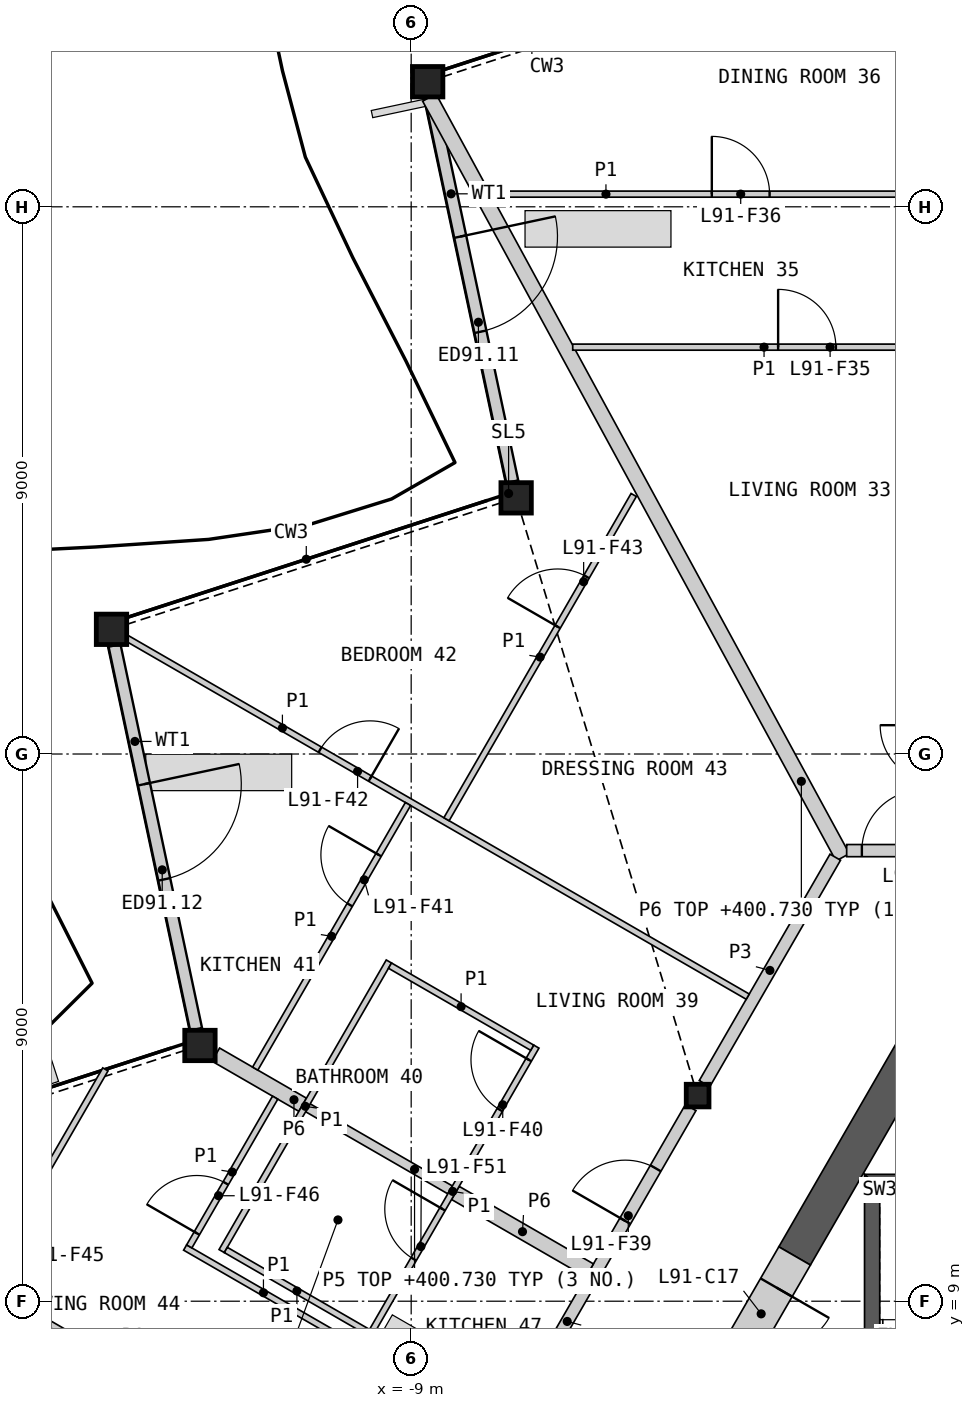
"""IFC4 building model, lengths in metres.
Left out: names, types, materials, properties, quantities, classifications, styles, units other than length and angle.
Written with IfcOpenShell. Run it as: python <this file> out.ifc"""

import sys

from ifc_helpers import new_model, si_unit, direction, frame, frame_2d, origin, origin_2d, place, context, subcontext, project, spatial, polyline, rectangle, hollow_rectangle, i_section, outline, extrude, element, fill, save


model = new_model("IFC4")
c1 = context("Model", 3, precision=1e-05, world=origin(), true_north=direction((0.0, 1.0)))
c2 = subcontext(c1, "Body", "Model", "MODEL_VIEW")
j1 = project(units=[si_unit("LENGTHUNIT", "METRE"), si_unit("PLANEANGLEUNIT", "RADIAN")], contexts=[c1])
p1 = place(None, origin())
s1 = spatial("IfcSite", under=j1, at=p1, CompositionType="ELEMENT")
p2 = place(p1, origin())
s2 = spatial("IfcBuilding", under=s1, at=p2, CompositionType="ELEMENT")
p3 = place(p2, frame((0.0, 0.0, 398.4)))
s3 = spatial("IfcBuildingStorey", under=s2, at=p3, CompositionType="ELEMENT", Elevation=398.4)
for number, where, z_axis, x_axis in (
    (1, (-8.729, 29.057, 0.0), (0.0, 0.0, 1.0), (1.0, 0.0, 0.0)),
    (2, (-7.274, 22.213, 0.0), (0.0, 0.0, 1.0), (1.0, 0.0, 0.0)),
    (3, (-13.929, 20.051, 0.0), (0.0, 0.0, 1.0), (1.0, 0.0, 0.0)),
    (4, (-12.474, 13.206, 0.0), (0.0, 0.0, 1.0), (1.0, 0.0, 0.0)),
):
    element("IfcColumn", number, at=place(p3, frame(where, z_axis=z_axis, x_axis=x_axis)), inside=s3, PredefinedType="COLUMN", context=c2, shape_type="SweptSolid", body=[
        extrude(hollow_rectangle(XDim=0.5, YDim=0.5, WallThickness=0.03, at=origin_2d()), origin(), (0.0, 0.0, 1.0), 3.4),
    ])
p4 = place(p3, frame((-4.289, 12.382, 0.0), z_axis=(0.0, 0.0, 1.0), x_axis=(1.0, 0.0, 0.0)))
e5 = element("IfcColumn", 5, at=p4, inside=s3, PredefinedType="COLUMN", context=c2, shape_type="SweptSolid", body=[
    extrude(i_section(OverallWidth=0.374, OverallDepth=0.372, WebThickness=0.016, FlangeThickness=0.026, at=origin_2d()), origin(), (0.0, 0.0, 1.0), 3.4),
])
p5 = place(p3, frame((-8.679, 28.792, 0.0), z_axis=(0.0, 0.0, 1.0), x_axis=(0.207932057694, -0.978143271399, 0.0)))
e6 = element("IfcWall", 6, at=p5, inside=s3, PredefinedType="SOLIDWALL", context=c2, shape_type="SweptSolid", body=[
    extrude(rectangle(XDim=6.453, YDim=0.2, at=frame_2d((3.227, 0.0))), origin(), (0.0, 0.0, 1.0), 2.634),
])
p6 = place(p5, frame((2.333, 0.0, 0.0)))
e7 = element("IfcOpeningElement", 7, at=p6, cuts=e6, PredefinedType="OPENING", context=c2, shape_type="SweptSolid", body=[
    extrude(rectangle(XDim=1.6, YDim=2.25, at=frame_2d((0.8, 1.125))), frame((0.0, 0.11, 0.0), z_axis=(0.0, -1.0, 0.0), x_axis=(1.0, 0.0, 0.0)), (0.0, 0.0, 1.0), 0.22),
])
p7 = place(p3, frame((-13.879, 19.785, 0.0), z_axis=(0.0, 0.0, 1.0), x_axis=(0.207895859675, -0.978150965613, 0.0)))
e8 = element("IfcWall", 8, at=p7, inside=s3, PredefinedType="SOLIDWALL", context=c2, shape_type="SweptSolid", body=[
    extrude(rectangle(XDim=6.453, YDim=0.2, at=frame_2d((3.227, 0.0))), origin(), (0.0, 0.0, 1.0), 2.634),
])
p8 = place(p7, frame((2.333, 0.0, 0.0)))
e9 = element("IfcOpeningElement", 9, at=p8, cuts=e8, PredefinedType="OPENING", context=c2, shape_type="SweptSolid", body=[
    extrude(rectangle(XDim=1.6, YDim=2.25, at=frame_2d((0.8, 1.125))), frame((0.0, 0.11, 0.0), z_axis=(0.0, -1.0, 0.0), x_axis=(1.0, 0.0, 0.0)), (0.0, 0.0, 1.0), 0.22),
])
p9 = place(p3, origin())
e10 = element("IfcWall", 10, at=p9, inside=s3, PredefinedType="SHEAR", context=c2, shape_type="SweptSolid", body=[
    extrude(outline(polyline([(1.544, 11.087), (-1.544, 11.087), (-1.294, 10.837), (1.294, 10.837), (1.544, 11.087)])), origin(), (0.0, 0.0, 1.0), 3.1),
])
p10 = place(p3, origin())
e11 = element("IfcWall", 11, at=p10, inside=s3, PredefinedType="SHEAR", context=c2, shape_type="SweptSolid", body=[
    extrude(outline(polyline([(-1.294, 10.837), (-1.544, 11.087), (-1.544, 5.237), (-1.294, 5.237), (-1.294, 10.837)])), origin(), (0.0, 0.0, 1.0), 3.1),
])
p11 = place(p3, frame((-0.26, 13.961, 0.0), z_axis=(0.0, 0.0, 1.0), x_axis=(-0.50000604952, -0.866021911064, 0.0)))
e12 = element("IfcWall", 12, at=p11, inside=s3, PredefinedType="SHEAR", context=c2, shape_type="SweptSolid", body=[
    extrude(rectangle(XDim=4.869, YDim=0.6, at=frame_2d((2.434, 0.0))), origin(), (0.0, 0.0, 1.0), 3.1),
])
p12 = place(p3, frame((-2.694, 9.745, 0.0), z_axis=(0.0, 0.0, 1.0), x_axis=(-0.50002983664, -0.866008176907, 0.0)))
e13 = element("IfcWall", 13, at=p12, inside=s3, PredefinedType="SHEAR", context=c2, shape_type="SweptSolid", body=[
    extrude(rectangle(XDim=2.2, YDim=0.6, at=frame_2d((1.1, 0.0))), origin(), (0.0, 0.0, 1.0), 3.1),
])
p13 = place(p12, frame((0.6, 0.0, 0.0)))
e14 = element("IfcOpeningElement", 14, at=p13, cuts=e13, PredefinedType="OPENING", context=c2, shape_type="SweptSolid", body=[
    extrude(rectangle(XDim=1.0, YDim=2.1, at=frame_2d((0.5, 1.05))), frame((0.0, 0.31, 0.0), z_axis=(0.0, -1.0, 0.0), x_axis=(1.0, 0.0, 0.0)), (0.0, 0.0, 1.0), 0.62),
])
p14 = place(p3, frame((-8.702, 28.797, 0.0), z_axis=(0.0, 0.0, 1.0), x_axis=(0.47791275145, -0.878407309852, 0.0)))
e15 = element("IfcWall", 15, at=p14, inside=s3, PredefinedType="PARTITIONING", context=c2, shape_type="SweptSolid", body=[
    extrude(rectangle(XDim=14.226, YDim=0.25, at=frame_2d((7.113, 0.0))), origin(), (0.0, 0.0, 1.0), 2.33),
])
p15 = place(p3, frame((-8.465, 5.15, 0.0), z_axis=(0.0, 0.0, 1.0), x_axis=(0.499992155518, 0.866029932751, 0.0)))
e16 = element("IfcWall", 16, at=p15, inside=s3, PredefinedType="PARTITIONING", context=c2, shape_type="SweptSolid", body=[
    extrude(rectangle(XDim=8.123, YDim=0.2, at=frame_2d((4.062, 0.0))), origin(), (0.0, 0.0, 1.0), 3.1),
])
p16 = place(p15, frame((5.97, 0.0, 0.0)))
e17 = element("IfcOpeningElement", 17, at=p16, cuts=e16, PredefinedType="OPENING", context=c2, shape_type="SweptSolid", body=[
    extrude(rectangle(XDim=1.0, YDim=2.1, at=frame_2d((0.5, 1.05))), frame((0.0, 0.11, 0.0), z_axis=(0.0, -1.0, 0.0), x_axis=(1.0, 0.0, 0.0)), (0.0, 0.0, 1.0), 0.22),
])
p17 = place(p15, frame((0.832, 0.0, 0.0)))
e18 = element("IfcOpeningElement", 18, at=p17, cuts=e16, PredefinedType="OPENING", context=c2, shape_type="SweptSolid", body=[
    extrude(rectangle(XDim=1.0, YDim=2.1, at=frame_2d((0.5, 1.05))), frame((0.0, 0.11, 0.0), z_axis=(0.0, -1.0, 0.0), x_axis=(1.0, 0.0, 0.0)), (0.0, 0.0, 1.0), 0.22),
])
p18 = place(p3, frame((-4.176, 12.579, 0.0), z_axis=(0.0, 0.0, 1.0), x_axis=(0.500004215162, 0.866022970146, 0.0)))
e19 = element("IfcWall", 19, at=p18, inside=s3, PredefinedType="PARTITIONING", context=c2, shape_type="SweptSolid", body=[
    extrude(rectangle(XDim=4.3, YDim=0.2, at=frame_2d((2.15, 0.0))), origin(), (0.0, 0.0, 1.0), 3.1),
])
p19 = place(p3, frame((-1.838, 16.411, 0.0), z_axis=(0.0, 0.0, 1.0), x_axis=(1.0, 0.0, 0.0)))
e20 = element("IfcWall", 20, at=p19, inside=s3, PredefinedType="PARTITIONING", context=c2, shape_type="SweptSolid", body=[
    extrude(rectangle(XDim=3.676, YDim=0.2, at=frame_2d((1.838, 0.0))), origin(), (0.0, 0.0, 1.0), 3.1),
])
p20 = place(p19, frame((0.25, 0.0, 0.0)))
e21 = element("IfcOpeningElement", 21, at=p20, cuts=e20, PredefinedType="OPENING", context=c2, shape_type="SweptSolid", body=[
    extrude(rectangle(XDim=1.0, YDim=2.1, at=frame_2d((0.5, 1.05))), frame((0.0, 0.11, 0.0), z_axis=(0.0, -1.0, 0.0), x_axis=(1.0, 0.0, 0.0)), (0.0, 0.0, 1.0), 0.22),
])
p21 = place(p3, frame((-8.273, 10.781, 0.0), z_axis=(0.0, 0.0, 1.0), x_axis=(0.866030925526, -0.499990435942, 0.0)))
e22 = element("IfcWall", 22, at=p21, inside=s3, PredefinedType="PARTITIONING", context=c2, shape_type="SweptSolid", body=[
    extrude(rectangle(XDim=2.55, YDim=0.25, at=frame_2d((1.275, 0.0))), origin(), (0.0, 0.0, 1.0), 2.33),
])
p22 = place(p3, frame((-12.214, 13.056, 0.0), z_axis=(0.0, 0.0, 1.0), x_axis=(0.866040211805, -0.499974350878, 0.0)))
e23 = element("IfcWall", 23, at=p22, inside=s3, PredefinedType="PARTITIONING", context=c2, shape_type="SweptSolid", body=[
    extrude(rectangle(XDim=1.65, YDim=0.25, at=frame_2d((0.825, 0.0))), origin(), (0.0, 0.0, 1.0), 2.33),
])
p23 = place(p3, frame((-10.698, 12.181, 0.0), z_axis=(0.0, 0.0, 1.0), x_axis=(0.86599734893, -0.500048589285, 0.0)))
e24 = element("IfcWall", 24, at=p23, inside=s3, PredefinedType="PLUMBINGWALL", context=c2, shape_type="SweptSolid", body=[
    extrude(rectangle(XDim=2.7, YDim=0.15, at=frame_2d((1.35, 0.0))), origin(), (0.0, 0.0, 1.0), 2.33),
])
p24 = place(p3, frame((-13.669, 19.9, 0.0), z_axis=(0.0, 0.0, 1.0), x_axis=(0.866032376801, -0.499987922186, 0.0)))
e25 = element("IfcWall", 25, at=p24, inside=s3, PredefinedType="PARTITIONING", context=c2, shape_type="SweptSolid", body=[
    extrude(rectangle(XDim=11.782, YDim=0.1, at=frame_2d((5.891, 0.0))), origin(), (0.0, 0.0, 1.0), 2.33),
])
p25 = place(p24, frame((3.661, 0.0, 0.0)))
e26 = element("IfcOpeningElement", 26, at=p25, cuts=e25, PredefinedType="OPENING", context=c2, shape_type="SweptSolid", body=[
    extrude(rectangle(XDim=0.95, YDim=2.1, at=frame_2d((0.475, 1.05))), frame((0.0, 0.06, 0.0), z_axis=(0.0, -1.0, 0.0), x_axis=(1.0, 0.0, 0.0)), (0.0, 0.0, 1.0), 0.12),
])
p26 = place(p3, frame((-18.869, 10.894, 0.0), z_axis=(0.0, 0.0, 1.0), x_axis=(0.866023724155, -0.500002909193, 0.0)))
e27 = element("IfcWall", 27, at=p26, inside=s3, PredefinedType="PARTITIONING", context=c2, shape_type="SweptSolid", body=[
    extrude(rectangle(XDim=11.655, YDim=0.1, at=frame_2d((5.827, 0.0))), origin(), (0.0, 0.0, 1.0), 2.33),
])
p27 = place(p26, frame((6.453, 0.0, 0.0)))
e28 = element("IfcOpeningElement", 28, at=p27, cuts=e27, PredefinedType="OPENING", context=c2, shape_type="SweptSolid", body=[
    extrude(rectangle(XDim=0.95, YDim=2.1, at=frame_2d((0.475, 1.05))), frame((0.0, 0.06, 0.0), z_axis=(0.0, -1.0, 0.0), x_axis=(1.0, 0.0, 0.0)), (0.0, 0.0, 1.0), 0.12),
])
p28 = place(p3, frame((-7.712, 27.208, 0.0), z_axis=(0.0, 0.0, 1.0), x_axis=(1.0, 0.0, 0.0)))
e29 = element("IfcWall", 29, at=p28, inside=s3, PredefinedType="PARTITIONING", context=c2, shape_type="SweptSolid", body=[
    extrude(rectangle(XDim=7.662, YDim=0.1, at=frame_2d((3.831, 0.0))), origin(), (0.0, 0.0, 1.0), 2.33),
])
p29 = place(p28, frame((3.657, 0.0, 0.0)))
e30 = element("IfcOpeningElement", 30, at=p29, cuts=e29, PredefinedType="OPENING", context=c2, shape_type="SweptSolid", body=[
    extrude(rectangle(XDim=0.95, YDim=2.1, at=frame_2d((0.475, 1.05))), frame((0.0, 0.06, 0.0), z_axis=(0.0, -1.0, 0.0), x_axis=(1.0, 0.0, 0.0)), (0.0, 0.0, 1.0), 0.12),
])
p30 = place(p3, frame((-6.343, 24.692, 0.0), z_axis=(0.0, 0.0, 1.0), x_axis=(1.0, 0.0, 0.0)))
e31 = element("IfcWall", 31, at=p30, inside=s3, PredefinedType="PARTITIONING", context=c2, shape_type="SweptSolid", body=[
    extrude(rectangle(XDim=6.293, YDim=0.1, at=frame_2d((3.146, 0.0))), origin(), (0.0, 0.0, 1.0), 2.33),
])
p31 = place(p30, frame((3.378, 0.0, 0.0)))
e32 = element("IfcOpeningElement", 32, at=p31, cuts=e31, PredefinedType="OPENING", context=c2, shape_type="SweptSolid", body=[
    extrude(rectangle(XDim=0.95, YDim=2.1, at=frame_2d((0.475, 1.05))), frame((0.0, 0.06, 0.0), z_axis=(0.0, -1.0, 0.0), x_axis=(1.0, 0.0, 0.0)), (0.0, 0.0, 1.0), 0.12),
])
p32 = place(p3, frame((-8.419, 16.927, 0.0), z_axis=(0.0, 0.0, 1.0), x_axis=(0.500027893485, 0.866009298874, 0.0)))
e33 = element("IfcWall", 33, at=p32, inside=s3, PredefinedType="PARTITIONING", context=c2, shape_type="SweptSolid", body=[
    extrude(rectangle(XDim=6.158, YDim=0.1, at=frame_2d((3.079, 0.0))), origin(), (0.0, 0.0, 1.0), 2.33),
])
p33 = place(p32, frame((3.656, 0.0, 0.0)))
e34 = element("IfcOpeningElement", 34, at=p33, cuts=e33, PredefinedType="OPENING", context=c2, shape_type="SweptSolid", body=[
    extrude(rectangle(XDim=0.95, YDim=2.1, at=frame_2d((0.475, 1.05))), frame((0.0, 0.06, 0.0), z_axis=(0.0, -1.0, 0.0), x_axis=(1.0, 0.0, 0.0)), (0.0, 0.0, 1.0), 0.12),
])
p34 = place(p3, frame((-12.718, 9.883, 0.0), z_axis=(0.0, 0.0, 1.0), x_axis=(0.866017493347, -0.500013701029, 0.0)))
e35 = element("IfcWall", 35, at=p34, inside=s3, PredefinedType="PARTITIONING", context=c2, shape_type="SweptSolid", body=[
    extrude(rectangle(XDim=5.95, YDim=0.1, at=frame_2d((2.975, 0.0))), origin(), (0.0, 0.0, 1.0), 2.33),
])
p35 = place(p3, frame((-12.117, 9.824, 0.0), z_axis=(0.0, 0.0, 1.0), x_axis=(0.499996545922, 0.866027397988, 0.0)))
e36 = element("IfcWall", 36, at=p35, inside=s3, PredefinedType="PARTITIONING", context=c2, shape_type="SweptSolid", body=[
    extrude(rectangle(XDim=5.5, YDim=0.1, at=frame_2d((2.75, 0.0))), origin(), (0.0, 0.0, 1.0), 2.33),
])
p36 = place(p3, frame((-9.692, 8.425, 0.0), z_axis=(0.0, 0.0, 1.0), x_axis=(0.499996545922, 0.866027397988, 0.0)))
e37 = element("IfcWall", 37, at=p36, inside=s3, PredefinedType="PARTITIONING", context=c2, shape_type="SweptSolid", body=[
    extrude(rectangle(XDim=5.5, YDim=0.1, at=frame_2d((2.75, 0.0))), origin(), (0.0, 0.0, 1.0), 2.33),
])
p37 = place(p36, frame((4.3, 0.0, 0.0)))
e38 = element("IfcOpeningElement", 38, at=p37, cuts=e37, PredefinedType="OPENING", context=c2, shape_type="SweptSolid", body=[
    extrude(rectangle(XDim=0.95, YDim=2.1, at=frame_2d((0.475, 1.05))), frame((0.0, 0.06, 0.0), z_axis=(0.0, -1.0, 0.0), x_axis=(1.0, 0.0, 0.0)), (0.0, 0.0, 1.0), 0.12),
])
p38 = place(p36, frame((1.465, 0.0, 0.0)))
e39 = element("IfcOpeningElement", 39, at=p38, cuts=e37, PredefinedType="OPENING", context=c2, shape_type="SweptSolid", body=[
    extrude(rectangle(XDim=0.95, YDim=2.1, at=frame_2d((0.475, 1.05))), frame((0.0, 0.06, 0.0), z_axis=(0.0, -1.0, 0.0), x_axis=(1.0, 0.0, 0.0)), (0.0, 0.0, 1.0), 0.12),
])
p39 = place(p3, frame((-11.565, 12.826, 0.0), z_axis=(0.0, 0.0, 1.0), x_axis=(0.499990214365, 0.86603105345, 0.0)))
e40 = element("IfcWall", 40, at=p39, inside=s3, PredefinedType="PARTITIONING", context=c2, shape_type="SweptSolid", body=[
    extrude(rectangle(XDim=5.025, YDim=0.1, at=frame_2d((2.512, 0.0))), origin(), (0.0, 0.0, 1.0), 2.33),
])
p40 = place(p39, frame((3.11, 0.0, 0.0)))
e41 = element("IfcOpeningElement", 41, at=p40, cuts=e40, PredefinedType="OPENING", context=c2, shape_type="SweptSolid", body=[
    extrude(rectangle(XDim=0.95, YDim=2.1, at=frame_2d((0.475, 1.05))), frame((0.0, 0.06, 0.0), z_axis=(0.0, -1.0, 0.0), x_axis=(1.0, 0.0, 0.0)), (0.0, 0.0, 1.0), 0.12),
])
p41 = place(p3, frame((-16.045, 9.321, 0.0), z_axis=(0.0, 0.0, 1.0), x_axis=(0.500014251897, 0.866017175291, 0.0)))
e42 = element("IfcWall", 42, at=p41, inside=s3, PredefinedType="PARTITIONING", context=c2, shape_type="SweptSolid", body=[
    extrude(rectangle(XDim=4.032, YDim=0.1, at=frame_2d((2.016, 0.0))), origin(), (0.0, 0.0, 1.0), 2.33),
])
p42 = place(p41, frame((0.56, 0.0, 0.0)))
e43 = element("IfcOpeningElement", 43, at=p42, cuts=e42, PredefinedType="OPENING", context=c2, shape_type="SweptSolid", body=[
    extrude(rectangle(XDim=0.95, YDim=2.1, at=frame_2d((0.475, 1.05))), frame((0.0, 0.06, 0.0), z_axis=(0.0, -1.0, 0.0), x_axis=(1.0, 0.0, 0.0)), (0.0, 0.0, 1.0), 0.12),
])
p43 = place(p3, frame((-12.65, 9.901, 0.0), z_axis=(0.0, 0.0, 1.0), x_axis=(0.500024172624, 0.866011447264, 0.0)))
e44 = element("IfcWall", 44, at=p43, inside=s3, PredefinedType="PARTITIONING", context=c2, shape_type="SweptSolid", body=[
    extrude(rectangle(XDim=2.825, YDim=0.1, at=frame_2d((1.413, 0.0))), origin(), (0.0, 0.0, 1.0), 2.33),
])
p44 = place(p43, frame((0.25, 0.0, 0.0)))
e45 = element("IfcOpeningElement", 45, at=p44, cuts=e44, PredefinedType="OPENING", context=c2, shape_type="SweptSolid", body=[
    extrude(rectangle(XDim=0.95, YDim=2.1, at=frame_2d((0.475, 1.05))), frame((0.0, 0.06, 0.0), z_axis=(0.0, -1.0, 0.0), x_axis=(1.0, 0.0, 0.0)), (0.0, 0.0, 1.0), 0.12),
])
for number, where, z_axis, x_axis in (
    (46, (-9.348, 14.519, 0.0), (0.0, 0.0, 1.0), (0.866, -0.5, 0.0)),
    (47, (-12.048, 9.843, 0.0), (0.0, 0.0, 1.0), (0.866, -0.5, 0.0)),
):
    element("IfcWall", number, at=place(p3, frame(where, z_axis=z_axis, x_axis=x_axis)), inside=s3, PredefinedType="PARTITIONING", context=c2, shape_type="SweptSolid", body=[
        extrude(rectangle(XDim=2.7, YDim=0.1, at=frame_2d((1.35, 0.0))), origin(), (0.0, 0.0, 1.0), 2.33),
    ])
p45 = place(p6, origin())
e48 = element("IfcDoor", 48, at=p45, inside=s3, OperationType="DOUBLE_DOOR_SINGLE_SWING", PredefinedType="DOOR", context=c2, shape_type="SweptSolid", body=[
    extrude(rectangle(XDim=1.6, YDim=2.25, at=frame_2d((0.8, 1.125))), frame((0.0, 0.025, 0.0), z_axis=(0.0, -1.0, 0.0), x_axis=(1.0, 0.0, 0.0)), (0.0, 0.0, 1.0), 0.05),
])
fill(e7, e48)
p46 = place(p8, origin())
e49 = element("IfcDoor", 49, at=p46, inside=s3, OperationType="DOUBLE_DOOR_SINGLE_SWING", PredefinedType="DOOR", context=c2, shape_type="SweptSolid", body=[
    extrude(rectangle(XDim=1.6, YDim=2.25, at=frame_2d((0.8, 1.125))), frame((0.0, 0.025, 0.0), z_axis=(0.0, -1.0, 0.0), x_axis=(1.0, 0.0, 0.0)), (0.0, 0.0, 1.0), 0.05),
])
fill(e9, e49)
p47 = place(p13, origin())
e50 = element("IfcDoor", 50, at=p47, inside=s3, OperationType="SINGLE_SWING_LEFT", PredefinedType="DOOR", context=c2, shape_type="SweptSolid", body=[
    extrude(rectangle(XDim=1.0, YDim=2.1, at=frame_2d((0.5, 1.05))), frame((0.0, 0.055, 0.0), z_axis=(0.0, -1.0, 0.0), x_axis=(1.0, 0.0, 0.0)), (0.0, 0.0, 1.0), 0.05),
])
fill(e14, e50)
p48 = place(p20, origin())
e51 = element("IfcDoor", 51, at=p48, inside=s3, OperationType="SINGLE_SWING_RIGHT", PredefinedType="DOOR", context=c2, shape_type="SweptSolid", body=[
    extrude(rectangle(XDim=1.0, YDim=2.1, at=frame_2d((0.5, 1.05))), frame((0.0, 0.025, 0.0), z_axis=(0.0, -1.0, 0.0), x_axis=(1.0, 0.0, 0.0)), (0.0, 0.0, 1.0), 0.05),
])
fill(e21, e51)
p49 = place(p31, origin())
e52 = element("IfcDoor", 52, at=p49, inside=s3, OperationType="SINGLE_SWING_LEFT", PredefinedType="DOOR", context=c2, shape_type="SweptSolid", body=[
    extrude(rectangle(XDim=0.95, YDim=2.1, at=frame_2d((0.475, 1.05))), frame((0.0, 0.025, 0.0), z_axis=(0.0, -1.0, 0.0), x_axis=(1.0, 0.0, 0.0)), (0.0, 0.0, 1.0), 0.05),
])
fill(e32, e52)
p50 = place(p29, origin())
e53 = element("IfcDoor", 53, at=p50, inside=s3, OperationType="SINGLE_SWING_LEFT", PredefinedType="DOOR", context=c2, shape_type="SweptSolid", body=[
    extrude(rectangle(XDim=0.95, YDim=2.1, at=frame_2d((0.475, 1.05))), frame((0.0, 0.025, 0.0), z_axis=(0.0, -1.0, 0.0), x_axis=(1.0, 0.0, 0.0)), (0.0, 0.0, 1.0), 0.05),
])
fill(e30, e53)
p51 = place(p16, origin())
e54 = element("IfcDoor", 54, at=p51, inside=s3, OperationType="SINGLE_SWING_LEFT", PredefinedType="DOOR", context=c2, shape_type="SweptSolid", body=[
    extrude(rectangle(XDim=1.0, YDim=2.1, at=frame_2d((0.5, 1.05))), frame((0.0, 0.025, 0.0), z_axis=(0.0, -1.0, 0.0), x_axis=(1.0, 0.0, 0.0)), (0.0, 0.0, 1.0), 0.05),
])
fill(e17, e54)
p52 = place(p37, origin())
e55 = element("IfcDoor", 55, at=p52, inside=s3, OperationType="SINGLE_SWING_RIGHT", PredefinedType="DOOR", context=c2, shape_type="SweptSolid", body=[
    extrude(rectangle(XDim=0.95, YDim=2.1, at=frame_2d((0.475, 1.05))), frame((0.0, 0.025, 0.0), z_axis=(0.0, -1.0, 0.0), x_axis=(1.0, 0.0, 0.0)), (0.0, 0.0, 1.0), 0.05),
])
fill(e38, e55)
p53 = place(p40, origin())
e56 = element("IfcDoor", 56, at=p53, inside=s3, OperationType="SINGLE_SWING_RIGHT", PredefinedType="DOOR", context=c2, shape_type="SweptSolid", body=[
    extrude(rectangle(XDim=0.95, YDim=2.1, at=frame_2d((0.475, 1.05))), frame((0.0, 0.025, 0.0), z_axis=(0.0, -1.0, 0.0), x_axis=(1.0, 0.0, 0.0)), (0.0, 0.0, 1.0), 0.05),
])
fill(e41, e56)
p54 = place(p25, origin())
e57 = element("IfcDoor", 57, at=p54, inside=s3, OperationType="SINGLE_SWING_RIGHT", PredefinedType="DOOR", context=c2, shape_type="SweptSolid", body=[
    extrude(rectangle(XDim=0.95, YDim=2.1, at=frame_2d((0.475, 1.05))), frame((0.0, 0.025, 0.0), z_axis=(0.0, -1.0, 0.0), x_axis=(1.0, 0.0, 0.0)), (0.0, 0.0, 1.0), 0.05),
])
fill(e26, e57)
p55 = place(p33, origin())
e58 = element("IfcDoor", 58, at=p55, inside=s3, OperationType="SINGLE_SWING_LEFT", PredefinedType="DOOR", context=c2, shape_type="SweptSolid", body=[
    extrude(rectangle(XDim=0.95, YDim=2.1, at=frame_2d((0.475, 1.05))), frame((0.0, 0.025, 0.0), z_axis=(0.0, -1.0, 0.0), x_axis=(1.0, 0.0, 0.0)), (0.0, 0.0, 1.0), 0.05),
])
fill(e34, e58)
p56 = place(p44, origin())
e59 = element("IfcDoor", 59, at=p56, inside=s3, OperationType="SINGLE_SWING_LEFT", PredefinedType="DOOR", context=c2, shape_type="SweptSolid", body=[
    extrude(rectangle(XDim=0.95, YDim=2.1, at=frame_2d((0.475, 1.05))), frame((0.0, 0.025, 0.0), z_axis=(0.0, -1.0, 0.0), x_axis=(1.0, 0.0, 0.0)), (0.0, 0.0, 1.0), 0.05),
])
fill(e45, e59)
p57 = place(p38, origin())
e60 = element("IfcDoor", 60, at=p57, inside=s3, OperationType="SINGLE_SWING_RIGHT", PredefinedType="DOOR", context=c2, shape_type="SweptSolid", body=[
    extrude(rectangle(XDim=0.95, YDim=2.1, at=frame_2d((0.475, 1.05))), frame((0.0, 0.025, 0.0), z_axis=(0.0, -1.0, 0.0), x_axis=(1.0, 0.0, 0.0)), (0.0, 0.0, 1.0), 0.05),
])
fill(e39, e60)
save(model, sys.argv[1])
